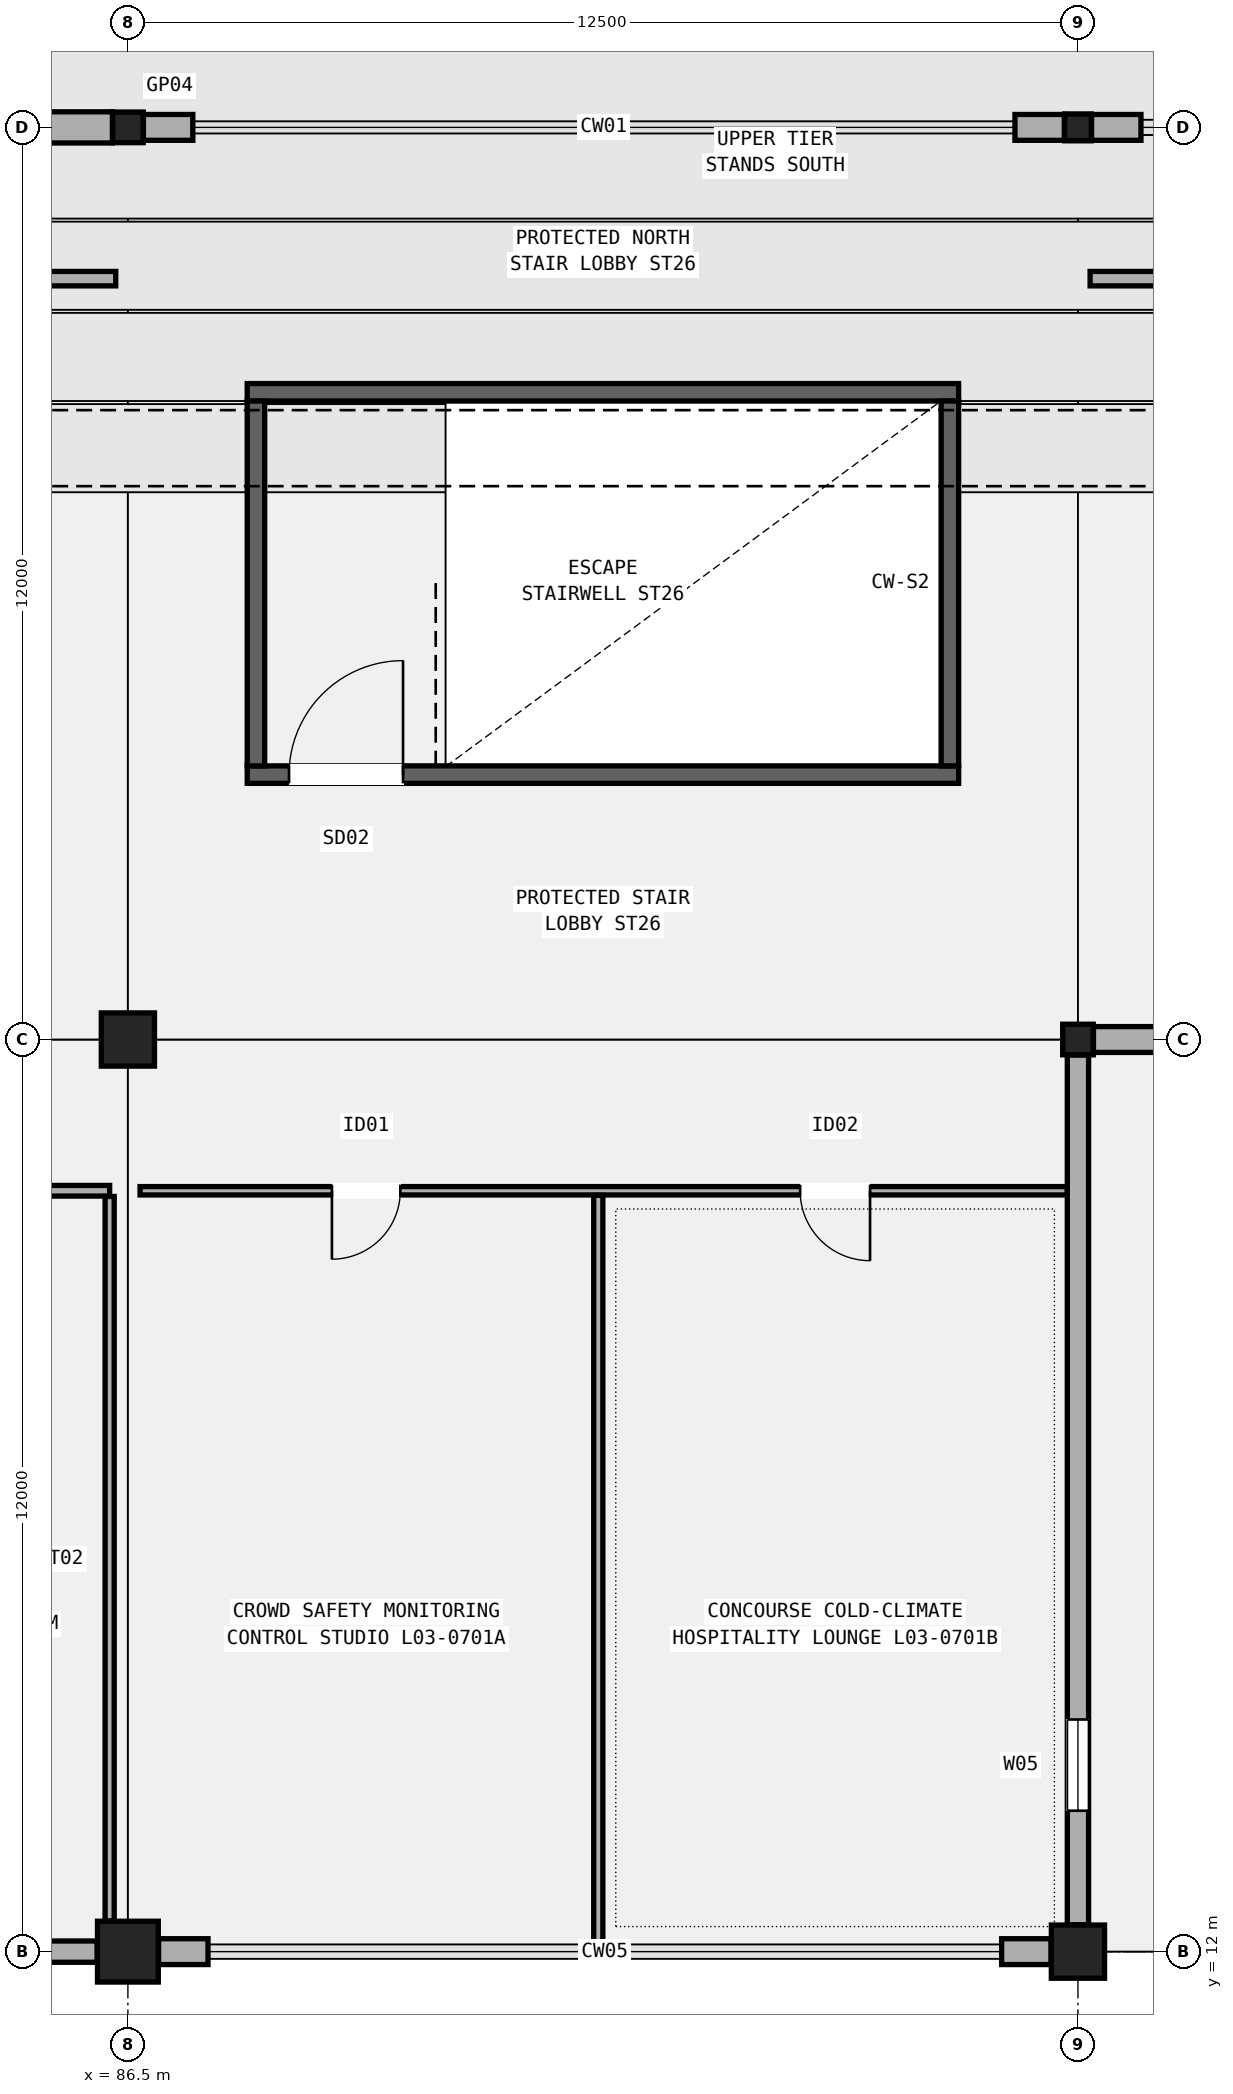
"""IFC4 building model, lengths in metres.
Left out: names, types, materials, properties, quantities, classifications, styles, units other than length and angle.
Written with IfcOpenShell. Run it as: python <this file> out.ifc"""

import sys

from ifc_helpers import new_model, si_unit, direction, frame, frame_2d, origin, origin_2d, place, context, subcontext, project, spatial, rectangle, hollow_rectangle, extrude, element, fill, save


model = new_model("IFC4")
c1 = context("Model", 3, precision=1e-05, world=origin(), true_north=direction((0.0, 1.0)))
c2 = subcontext(c1, "Body", "Model", "MODEL_VIEW")
j1 = project(units=[si_unit("LENGTHUNIT", "METRE"), si_unit("PLANEANGLEUNIT", "RADIAN")], contexts=[c1])
p1 = place(None, origin())
s1 = spatial("IfcSite", under=j1, at=p1, CompositionType="ELEMENT")
p2 = place(p1, origin())
s2 = spatial("IfcBuilding", under=s1, at=p2, CompositionType="ELEMENT")
p3 = place(p2, frame((0.0, 0.0, 15.3)))
s3 = spatial("IfcBuildingStorey", under=s2, at=p3, CompositionType="ELEMENT", Elevation=15.3)
p4 = place(p3, frame((86.5, 12.0, 0.0), z_axis=(0.0, 0.0, 1.0), x_axis=(1.0, 0.0, 0.0)))
e1 = element("IfcColumn", 1, at=p4, inside=s3, PredefinedType="COLUMN", context=c2, shape_type="SweptSolid", body=[
    extrude(rectangle(XDim=0.8, YDim=0.8, at=origin_2d()), origin(), (0.0, 0.0, 1.0), 5.1),
])
p5 = place(p3, frame((86.5, 24.0, 0.0), z_axis=(0.0, 0.0, 1.0), x_axis=(1.0, 0.0, 0.0)))
e2 = element("IfcColumn", 2, at=p5, inside=s3, PredefinedType="COLUMN", context=c2, shape_type="SweptSolid", body=[
    extrude(rectangle(XDim=0.7, YDim=0.7, at=origin_2d()), origin(), (0.0, 0.0, 1.0), 5.1),
])
p6 = place(p3, frame((86.5, 36.0, 0.0), z_axis=(0.0, 0.0, 1.0), x_axis=(1.0, 0.0, 0.0)))
e3 = element("IfcColumn", 3, at=p6, inside=s3, PredefinedType="COLUMN", context=c2, shape_type="SweptSolid", body=[
    extrude(hollow_rectangle(XDim=0.4, YDim=0.4, WallThickness=0.016, InnerFilletRadius=0.016, OuterFilletRadius=0.032, at=origin_2d()), origin(), (0.0, 0.0, 1.0), 5.1),
])
p7 = place(p3, frame((99.0, 12.0, 0.0), z_axis=(0.0, 0.0, 1.0), x_axis=(1.0, 0.0, 0.0)))
e4 = element("IfcColumn", 4, at=p7, inside=s3, PredefinedType="COLUMN", context=c2, shape_type="SweptSolid", body=[
    extrude(rectangle(XDim=0.7, YDim=0.7, at=origin_2d()), origin(), (0.0, 0.0, 1.0), 5.1),
])
p8 = place(p3, frame((99.0, 24.0, 0.0), z_axis=(0.0, 0.0, 1.0), x_axis=(1.0, 0.0, 0.0)))
e5 = element("IfcColumn", 5, at=p8, inside=s3, PredefinedType="COLUMN", context=c2, shape_type="SweptSolid", body=[
    extrude(hollow_rectangle(XDim=0.4, YDim=0.4, WallThickness=0.016, InnerFilletRadius=0.016, OuterFilletRadius=0.032, at=origin_2d()), origin(), (0.0, 0.0, 1.0), 5.1),
])
p9 = place(p3, frame((99.0, 36.0, 0.0), z_axis=(0.0, 0.0, 1.0), x_axis=(1.0, 0.0, 0.0)))
e6 = element("IfcColumn", 6, at=p9, inside=s3, PredefinedType="COLUMN", context=c2, shape_type="SweptSolid", body=[
    extrude(hollow_rectangle(XDim=0.35, YDim=0.35, WallThickness=0.016, InnerFilletRadius=0.016, OuterFilletRadius=0.032, at=origin_2d()), origin(), (0.0, 0.0, 1.0), 5.1),
])
p10 = place(p3, frame((74.179, 12.0, 0.0), z_axis=(0.0, 0.0, 1.0), x_axis=(1.0, 0.0, 0.0)))
e7 = element("IfcWall", 7, at=p10, inside=s3, PredefinedType="SOLIDWALL", context=c2, shape_type="SweptSolid", body=[
    extrude(rectangle(XDim=11.917, YDim=0.28, at=frame_2d((5.958, 0.0))), origin(), (0.0, 0.0, 1.0), 4.16),
])
p11 = place(p10, frame((3.533, 0.0, 0.95)))
e8 = element("IfcOpeningElement", 8, at=p11, cuts=e7, PredefinedType="OPENING", context=c2, shape_type="SweptSolid", body=[
    extrude(rectangle(XDim=0.9, YDim=2.4, at=frame_2d((0.45, 1.2))), frame((0.0, 0.15, 0.0), z_axis=(0.0, -1.0, 0.0), x_axis=(1.0, 0.0, 0.0)), (0.0, 0.0, 1.0), 0.3),
])
p12 = place(p3, frame((74.354, 36.0, 0.0), z_axis=(0.0, 0.0, 1.0), x_axis=(1.0, 0.0, 0.0)))
e9 = element("IfcWall", 9, at=p12, inside=s3, PredefinedType="SOLIDWALL", context=c2, shape_type="SweptSolid", body=[
    extrude(rectangle(XDim=11.942, YDim=0.41, at=frame_2d((5.971, 0.0))), origin(), (0.0, 0.0, 1.0), 4.06),
])
p13 = place(p12, frame((1.5, 0.0, 0.95)))
e10 = element("IfcOpeningElement", 10, at=p13, cuts=e9, PredefinedType="OPENING", context=c2, shape_type="SweptSolid", body=[
    extrude(rectangle(XDim=0.9, YDim=2.7, at=frame_2d((0.45, 1.35))), frame((0.0, 0.215, 0.0), z_axis=(0.0, -1.0, 0.0), x_axis=(1.0, 0.0, 0.0)), (0.0, 0.0, 1.0), 0.43),
])
for number, where, z_axis, x_axis in (
    (11, (86.904, 12.0, 0.0), (0.0, 0.0, 1.0), (1.0, 0.0, 0.0)),
    (12, (97.996, 12.0, 0.0), (0.0, 0.0, 1.0), (1.0, 0.0, 0.0)),
):
    element("IfcWall", number, at=place(p3, frame(where, z_axis=z_axis, x_axis=x_axis)), inside=s3, PredefinedType="SOLIDWALL", context=c2, shape_type="SweptSolid", body=[
        extrude(rectangle(XDim=0.65, YDim=0.34, at=frame_2d((0.325, 0.0))), origin(), (0.0, 0.0, 1.0), 4.172),
    ])
p14 = place(p3, frame((99.0, 12.354, 0.0), z_axis=(0.0, 0.0, 1.0), x_axis=(0.0, 1.0, 0.0)))
e13 = element("IfcWall", 13, at=p14, inside=s3, PredefinedType="SOLIDWALL", context=c2, shape_type="SweptSolid", body=[
    extrude(rectangle(XDim=11.442, YDim=0.28, at=frame_2d((5.721, 0.0))), origin(), (0.0, 0.0, 1.0), 4.06),
])
p15 = place(p14, frame((1.5, 0.0, 0.95)))
e14 = element("IfcOpeningElement", 14, at=p15, cuts=e13, PredefinedType="OPENING", context=c2, shape_type="SweptSolid", body=[
    extrude(rectangle(XDim=1.2, YDim=1.9, at=frame_2d((0.6, 0.95))), frame((0.0, 0.15, 0.0), z_axis=(0.0, -1.0, 0.0), x_axis=(1.0, 0.0, 0.0)), (0.0, 0.0, 1.0), 0.3),
])
p16 = place(p3, frame((86.704, 36.0, 0.0), z_axis=(0.0, 0.0, 1.0), x_axis=(1.0, 0.0, 0.0)))
e15 = element("IfcWall", 15, at=p16, inside=s3, PredefinedType="SOLIDWALL", context=c2, shape_type="SweptSolid", body=[
    extrude(rectangle(XDim=0.65, YDim=0.34, at=frame_2d((0.325, 0.0))), origin(), (0.0, 0.0, 1.0), 4.16),
])
p17 = place(p3, frame((98.171, 36.0, 0.0), z_axis=(0.0, 0.0, 1.0), x_axis=(1.0, 0.0, 0.0)))
e16 = element("IfcWall", 16, at=p17, inside=s3, PredefinedType="SOLIDWALL", context=c2, shape_type="SweptSolid", body=[
    extrude(rectangle(XDim=0.65, YDim=0.34, at=frame_2d((0.325, 0.0))), origin(), (0.0, 0.0, 1.0), 4.16),
])
p18 = place(p3, frame((99.204, 24.0, 0.0), z_axis=(0.0, 0.0, 1.0), x_axis=(1.0, 0.0, 0.0)))
e17 = element("IfcWall", 17, at=p18, inside=s3, PredefinedType="SOLIDWALL", context=c2, shape_type="SweptSolid", body=[
    extrude(rectangle(XDim=12.617, YDim=0.34, at=frame_2d((6.309, 0.0))), origin(), (0.0, 0.0, 1.0), 4.16),
])
p19 = place(p18, frame((1.5, 0.0, 0.95)))
e18 = element("IfcOpeningElement", 18, at=p19, cuts=e17, PredefinedType="OPENING", context=c2, shape_type="SweptSolid", body=[
    extrude(rectangle(XDim=1.35, YDim=2.0, at=frame_2d((0.675, 1.0))), frame((0.0, 0.18, 0.0), z_axis=(0.0, -1.0, 0.0), x_axis=(1.0, 0.0, 0.0)), (0.0, 0.0, 1.0), 0.36),
])
p20 = place(p3, frame((99.179, 36.0, 0.0), z_axis=(0.0, 0.0, 1.0), x_axis=(1.0, 0.0, 0.0)))
e19 = element("IfcWall", 19, at=p20, inside=s3, PredefinedType="SOLIDWALL", context=c2, shape_type="SweptSolid", body=[
    extrude(rectangle(XDim=0.65, YDim=0.34, at=frame_2d((0.325, 0.0))), origin(), (0.0, 0.0, 1.0), 4.172),
])
p21 = place(p3, frame((88.07, 27.485, 0.0), z_axis=(0.0, 0.0, 1.0), x_axis=(1.0, 0.0, 0.0)))
e20 = element("IfcWall", 20, at=p21, inside=s3, PredefinedType="SHEAR", context=c2, shape_type="SweptSolid", body=[
    extrude(rectangle(XDim=9.36, YDim=0.23, at=frame_2d((4.68, 0.0))), origin(), (0.0, 0.0, 1.0), 4.86),
])
p22 = place(p21, frame((0.55, 0.0, 0.0)))
e21 = element("IfcOpeningElement", 21, at=p22, cuts=e20, PredefinedType="OPENING", context=c2, shape_type="SweptSolid", body=[
    extrude(rectangle(XDim=1.5, YDim=2.2, at=frame_2d((0.75, 1.1))), frame((0.0, 0.125, 0.0), z_axis=(0.0, -1.0, 0.0), x_axis=(1.0, 0.0, 0.0)), (0.0, 0.0, 1.0), 0.25),
])
p23 = place(p3, frame((88.07, 32.515, 0.0), z_axis=(0.0, 0.0, 1.0), x_axis=(1.0, 0.0, 0.0)))
e22 = element("IfcWall", 22, at=p23, inside=s3, PredefinedType="SHEAR", context=c2, shape_type="SweptSolid", body=[
    extrude(rectangle(XDim=9.36, YDim=0.23, at=frame_2d((4.68, 0.0))), origin(), (0.0, 0.0, 1.0), 4.86),
])
for number, where, z_axis, x_axis in (
    (23, (88.185, 27.6, 0.0), (0.0, 0.0, 1.0), (0.0, 1.0, 0.0)),
    (24, (97.315, 27.6, 0.0), (0.0, 0.0, 1.0), (0.0, 1.0, 0.0)),
):
    element("IfcWall", number, at=place(p3, frame(where, z_axis=z_axis, x_axis=x_axis)), inside=s3, PredefinedType="SHEAR", context=c2, shape_type="SweptSolid", body=[
        extrude(rectangle(XDim=4.8, YDim=0.23, at=frame_2d((2.4, 0.0))), origin(), (0.0, 0.0, 1.0), 4.86),
    ])
p24 = place(p3, frame((74.024, 22.01, 0.0), z_axis=(0.0, 0.0, 1.0), x_axis=(1.0, 0.0, 0.0)))
e25 = element("IfcWall", 25, at=p24, inside=s3, PredefinedType="PARTITIONING", context=c2, shape_type="SweptSolid", body=[
    extrude(rectangle(XDim=12.236, YDim=0.14, at=frame_2d((6.118, 0.0))), origin(), (0.0, 0.0, 1.0), 4.22),
])
p25 = place(p24, frame((2.387, 0.0, 0.0), z_axis=(0.0, 0.0, 1.0), x_axis=(-1.0, 0.0, 0.0)))
e26 = element("IfcOpeningElement", 26, at=p25, cuts=e25, PredefinedType="OPENING", context=c2, shape_type="SweptSolid", body=[
    extrude(rectangle(XDim=1.48, YDim=2.24, at=frame_2d((0.74, 1.12))), frame((0.0, 0.08, 0.0), z_axis=(0.0, -1.0, 0.0), x_axis=(1.0, 0.0, 0.0)), (0.0, 0.0, 1.0), 0.16),
])
p26 = place(p24, frame((6.128, 0.0, 0.0), z_axis=(0.0, 0.0, 1.0), x_axis=(-1.0, 0.0, 0.0)))
e27 = element("IfcOpeningElement", 27, at=p26, cuts=e25, PredefinedType="OPENING", context=c2, shape_type="SweptSolid", body=[
    extrude(rectangle(XDim=1.52, YDim=2.28, at=frame_2d((0.76, 1.14))), frame((0.0, 0.08, 0.0), z_axis=(0.0, -1.0, 0.0), x_axis=(1.0, 0.0, 0.0)), (0.0, 0.0, 1.0), 0.16),
])
p27 = place(p24, frame((10.727, 0.0, 0.0), z_axis=(0.0, 0.0, 1.0), x_axis=(-1.0, 0.0, 0.0)))
e28 = element("IfcOpeningElement", 28, at=p27, cuts=e25, PredefinedType="OPENING", context=c2, shape_type="SweptSolid", body=[
    extrude(rectangle(XDim=1.56, YDim=2.26, at=frame_2d((0.78, 1.13))), frame((0.0, 0.08, 0.0), z_axis=(0.0, -1.0, 0.0), x_axis=(1.0, 0.0, 0.0)), (0.0, 0.0, 1.0), 0.16),
])
p28 = place(p3, frame((86.26, 12.404, 0.0), z_axis=(0.0, 0.0, 1.0), x_axis=(0.0, 1.0, 0.0)))
e29 = element("IfcWall", 29, at=p28, inside=s3, PredefinedType="PARTITIONING", context=c2, shape_type="SweptSolid", body=[
    extrude(rectangle(XDim=9.531, YDim=0.12, at=frame_2d((4.766, 0.0))), origin(), (0.0, 0.0, 1.0), 4.132),
])
p29 = place(p3, frame((74.16, 34.01, 0.0), z_axis=(0.0, 0.0, 1.0), x_axis=(1.0, 0.0, 0.0)))
e30 = element("IfcWall", 30, at=p29, inside=s3, PredefinedType="PARTITIONING", context=c2, shape_type="SweptSolid", body=[
    extrude(rectangle(XDim=12.18, YDim=0.19, at=frame_2d((6.09, 0.0))), origin(), (0.0, 0.0, 1.0), 2.77),
])
p30 = place(p29, frame((3.775, 0.0, 0.0), z_axis=(0.0, 0.0, 1.0), x_axis=(-1.0, 0.0, 0.0)))
e31 = element("IfcOpeningElement", 31, at=p30, cuts=e30, PredefinedType="OPENING", context=c2, shape_type="SweptSolid", body=[
    extrude(rectangle(XDim=1.6, YDim=2.3, at=frame_2d((0.8, 1.15))), frame((0.0, 0.105, 0.0), z_axis=(0.0, -1.0, 0.0), x_axis=(1.0, 0.0, 0.0)), (0.0, 0.0, 1.0), 0.21),
])
p31 = place(p29, frame((9.969, 0.0, 0.0), z_axis=(0.0, 0.0, 1.0), x_axis=(-1.0, 0.0, 0.0)))
e32 = element("IfcOpeningElement", 32, at=p31, cuts=e30, PredefinedType="OPENING", context=c2, shape_type="SweptSolid", body=[
    extrude(rectangle(XDim=1.65, YDim=2.28, at=frame_2d((0.825, 1.14))), frame((0.0, 0.105, 0.0), z_axis=(0.0, -1.0, 0.0), x_axis=(1.0, 0.0, 0.0)), (0.0, 0.0, 1.0), 0.21),
])
p32 = place(p3, frame((86.66, 22.01, 0.0), z_axis=(0.0, 0.0, 1.0), x_axis=(1.0, 0.0, 0.0)))
e33 = element("IfcWall", 33, at=p32, inside=s3, PredefinedType="PARTITIONING", context=c2, shape_type="SweptSolid", body=[
    extrude(rectangle(XDim=12.198, YDim=0.11, at=frame_2d((6.099, 0.0))), origin(), (0.0, 0.0, 1.0), 4.22),
])
p33 = place(p32, frame((3.424, 0.0, 0.0), z_axis=(0.0, 0.0, 1.0), x_axis=(-1.0, 0.0, 0.0)))
e34 = element("IfcOpeningElement", 34, at=p33, cuts=e33, PredefinedType="OPENING", context=c2, shape_type="SweptSolid", body=[
    extrude(rectangle(XDim=0.9, YDim=2.06, at=frame_2d((0.45, 1.03))), frame((0.0, 0.065, 0.0), z_axis=(0.0, -1.0, 0.0), x_axis=(1.0, 0.0, 0.0)), (0.0, 0.0, 1.0), 0.13),
])
p34 = place(p32, frame((9.604, 0.0, 0.0), z_axis=(0.0, 0.0, 1.0), x_axis=(-1.0, 0.0, 0.0)))
e35 = element("IfcOpeningElement", 35, at=p34, cuts=e33, PredefinedType="OPENING", context=c2, shape_type="SweptSolid", body=[
    extrude(rectangle(XDim=0.92, YDim=2.1, at=frame_2d((0.46, 1.05))), frame((0.0, 0.065, 0.0), z_axis=(0.0, -1.0, 0.0), x_axis=(1.0, 0.0, 0.0)), (0.0, 0.0, 1.0), 0.13),
])
p35 = place(p3, frame((92.689, 12.024, 0.0), z_axis=(0.0, 0.0, 1.0), x_axis=(0.0, 1.0, 0.0)))
e36 = element("IfcWall", 36, at=p35, inside=s3, PredefinedType="PARTITIONING", context=c2, shape_type="SweptSolid", body=[
    extrude(rectangle(XDim=9.926, YDim=0.12, at=frame_2d((4.963, 0.0))), origin(), (0.0, 0.0, 1.0), 4.22),
])
p36 = place(p3, frame((99.16, 34.01, 0.0), z_axis=(0.0, 0.0, 1.0), x_axis=(1.0, 0.0, 0.0)))
e37 = element("IfcWall", 37, at=p36, inside=s3, PredefinedType="PARTITIONING", context=c2, shape_type="SweptSolid", body=[
    extrude(rectangle(XDim=12.68, YDim=0.19, at=frame_2d((6.34, 0.0))), origin(), (0.0, 0.0, 1.0), 2.77),
])
p37 = place(p36, frame((6.83, 0.0, 0.0), z_axis=(0.0, 0.0, 1.0), x_axis=(-1.0, 0.0, 0.0)))
e38 = element("IfcOpeningElement", 38, at=p37, cuts=e37, PredefinedType="OPENING", context=c2, shape_type="SweptSolid", body=[
    extrude(rectangle(XDim=0.98, YDim=2.1, at=frame_2d((0.49, 1.05))), frame((0.0, 0.105, 0.0), z_axis=(0.0, -1.0, 0.0), x_axis=(1.0, 0.0, 0.0)), (0.0, 0.0, 1.0), 0.21),
])
p38 = place(p15, origin())
e39 = element("IfcWindow", 39, at=p38, inside=s3, PartitioningType="SINGLE_PANEL", PredefinedType="WINDOW", context=c2, shape_type="SweptSolid", body=[
    extrude(rectangle(XDim=1.2, YDim=1.9, at=frame_2d((0.6, 0.95))), frame((0.0, 0.03, 0.0), z_axis=(0.0, -1.0, 0.0), x_axis=(1.0, 0.0, 0.0)), (0.0, 0.0, 1.0), 0.06),
])
fill(e14, e39)
p39 = place(p22, origin())
e40 = element("IfcDoor", 40, at=p39, inside=s3, OperationType="SINGLE_SWING_RIGHT", PredefinedType="DOOR", context=c2, shape_type="SweptSolid", body=[
    extrude(rectangle(XDim=1.5, YDim=2.2, at=frame_2d((0.75, 1.1))), frame((0.0, 0.025, 0.0), z_axis=(0.0, -1.0, 0.0), x_axis=(1.0, 0.0, 0.0)), (0.0, 0.0, 1.0), 0.05),
])
fill(e21, e40)
p40 = place(p33, origin())
e41 = element("IfcDoor", 41, at=p40, inside=s3, OperationType="SINGLE_SWING_RIGHT", PredefinedType="DOOR", context=c2, shape_type="SweptSolid", body=[
    extrude(rectangle(XDim=0.9, YDim=2.06, at=frame_2d((0.45, 1.03))), frame((0.0, 0.025, 0.0), z_axis=(0.0, -1.0, 0.0), x_axis=(1.0, 0.0, 0.0)), (0.0, 0.0, 1.0), 0.05),
])
fill(e34, e41)
p41 = place(p34, origin())
e42 = element("IfcDoor", 42, at=p41, inside=s3, OperationType="SINGLE_SWING_LEFT", PredefinedType="DOOR", context=c2, shape_type="SweptSolid", body=[
    extrude(rectangle(XDim=0.92, YDim=2.1, at=frame_2d((0.46, 1.05))), frame((0.0, 0.025, 0.0), z_axis=(0.0, -1.0, 0.0), x_axis=(1.0, 0.0, 0.0)), (0.0, 0.0, 1.0), 0.05),
])
fill(e35, e42)
save(model, sys.argv[1])
